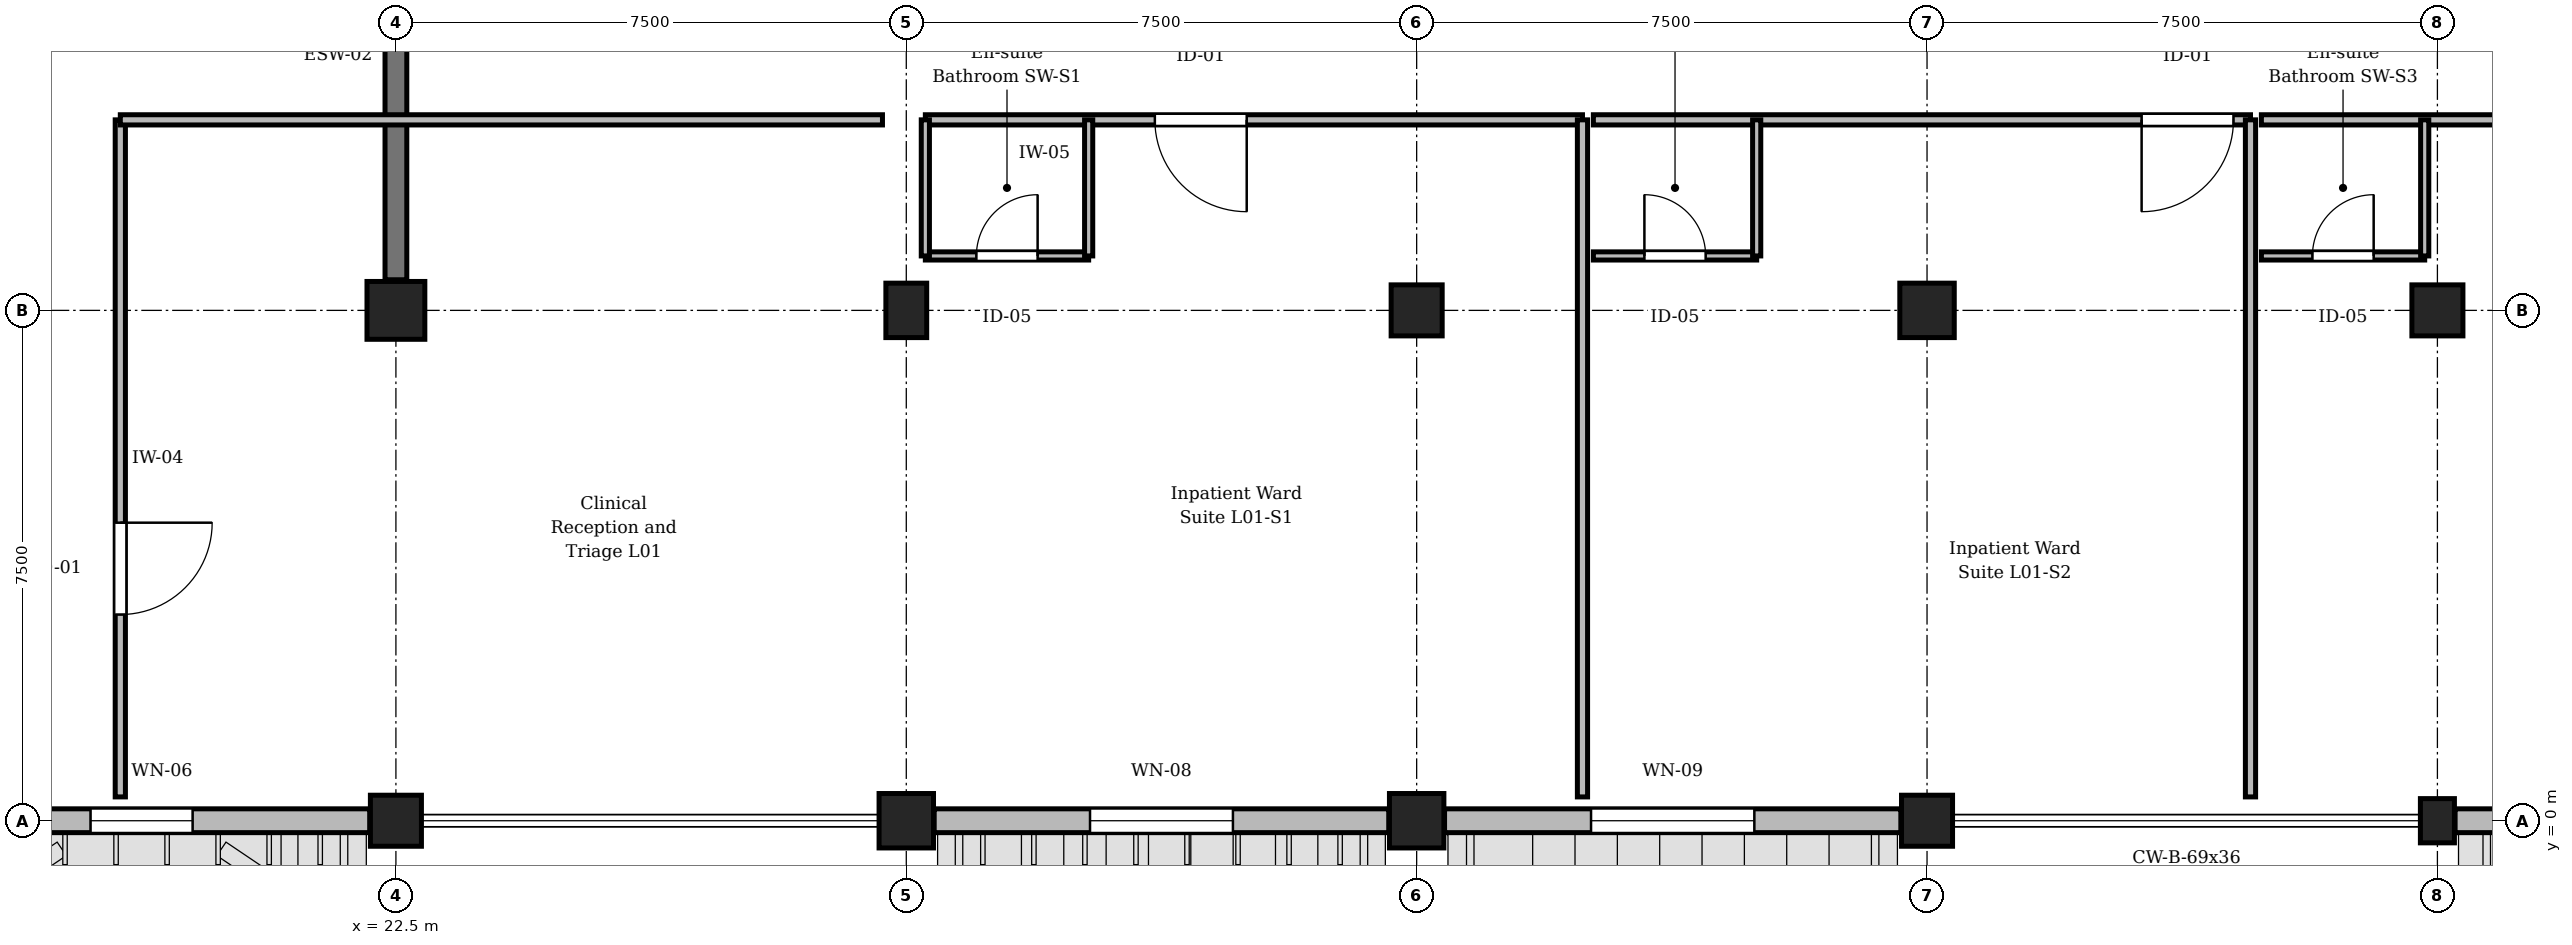
"""IFC4 building model, lengths in metres.
Left out: names, types, materials, properties, quantities, classifications, styles, units other than length and angle.
Written with IfcOpenShell. Run it as: python <this file> out.ifc"""

import sys

from ifc_helpers import new_model, si_unit, direction, frame, frame_2d, origin, origin_2d, place, context, subcontext, project, spatial, rectangle, circle, extrude, element, fill, save


model = new_model("IFC4")
c1 = context("Model", 3, precision=1e-05, world=origin(), true_north=direction((0.0, 1.0)))
c2 = subcontext(c1, "Body", "Model", "MODEL_VIEW")
j1 = project(units=[si_unit("LENGTHUNIT", "METRE"), si_unit("PLANEANGLEUNIT", "RADIAN")], contexts=[c1])
p1 = place(None, origin())
s1 = spatial("IfcSite", under=j1, at=p1, CompositionType="ELEMENT")
p2 = place(p1, origin())
s2 = spatial("IfcBuilding", under=s1, at=p2, CompositionType="ELEMENT")
p3 = place(p2, frame((0.0, 0.0, 4.8)))
s3 = spatial("IfcBuildingStorey", under=s2, at=p3, CompositionType="ELEMENT", Elevation=4.8)
p4 = place(p3, frame((22.5, 0.0, 0.0), z_axis=(0.0, 0.0, 1.0), x_axis=(1.0, 0.0, 0.0)))
e1 = element("IfcColumn", 1, at=p4, inside=s3, PredefinedType="COLUMN", context=c2, shape_type="SweptSolid", body=[
    extrude(circle(Radius=0.375, at=origin_2d()), origin(), (0.0, 0.0, 1.0), 4.5),
])
p5 = place(p3, frame((22.5, 7.5, 0.0), z_axis=(0.0, 0.0, 1.0), x_axis=(1.0, 0.0, 0.0)))
e2 = element("IfcColumn", 2, at=p5, inside=s3, PredefinedType="COLUMN", context=c2, shape_type="SweptSolid", body=[
    extrude(rectangle(XDim=0.85, YDim=0.85, at=origin_2d()), origin(), (0.0, 0.0, 1.0), 4.5),
])
p6 = place(p3, frame((30.0, 0.0, 0.0), z_axis=(0.0, 0.0, 1.0), x_axis=(1.0, 0.0, 0.0)))
e3 = element("IfcColumn", 3, at=p6, inside=s3, PredefinedType="COLUMN", context=c2, shape_type="SweptSolid", body=[
    extrude(rectangle(XDim=0.8, YDim=0.8, at=origin_2d()), origin(), (0.0, 0.0, 1.0), 4.5),
])
p7 = place(p3, frame((30.0, 7.5, 0.0), z_axis=(0.0, 0.0, 1.0), x_axis=(1.0, 0.0, 0.0)))
e4 = element("IfcColumn", 4, at=p7, inside=s3, PredefinedType="COLUMN", context=c2, shape_type="SweptSolid", body=[
    extrude(rectangle(XDim=0.6, YDim=0.8, at=origin_2d()), origin(), (0.0, 0.0, 1.0), 4.5),
])
p8 = place(p3, frame((37.5, 0.0, 0.0), z_axis=(0.0, 0.0, 1.0), x_axis=(1.0, 0.0, 0.0)))
e5 = element("IfcColumn", 5, at=p8, inside=s3, PredefinedType="COLUMN", context=c2, shape_type="SweptSolid", body=[
    extrude(rectangle(XDim=0.8, YDim=0.8, at=origin_2d()), origin(), (0.0, 0.0, 1.0), 4.5),
])
for number, where, z_axis, x_axis in (
    (6, (37.5, 7.5, 0.0), (0.0, 0.0, 1.0), (1.0, 0.0, 0.0)),
    (7, (45.0, 0.0, 0.0), (0.0, 0.0, 1.0), (1.0, 0.0, 0.0)),
):
    element("IfcColumn", number, at=place(p3, frame(where, z_axis=z_axis, x_axis=x_axis)), inside=s3, PredefinedType="COLUMN", context=c2, shape_type="SweptSolid", body=[
        extrude(circle(Radius=0.375, at=origin_2d()), origin(), (0.0, 0.0, 1.0), 4.5),
    ])
p9 = place(p3, frame((45.0, 7.5, 0.0), z_axis=(0.0, 0.0, 1.0), x_axis=(1.0, 0.0, 0.0)))
e8 = element("IfcColumn", 8, at=p9, inside=s3, PredefinedType="COLUMN", context=c2, shape_type="SweptSolid", body=[
    extrude(rectangle(XDim=0.8, YDim=0.8, at=origin_2d()), origin(), (0.0, 0.0, 1.0), 4.5),
])
p10 = place(p3, frame((52.5, 0.0, 0.0), z_axis=(0.0, 0.0, 1.0), x_axis=(1.0, 0.0, 0.0)))
e9 = element("IfcColumn", 9, at=p10, inside=s3, PredefinedType="COLUMN", context=c2, shape_type="SweptSolid", body=[
    extrude(rectangle(XDim=0.5, YDim=0.65, at=origin_2d()), origin(), (0.0, 0.0, 1.0), 4.5),
])
p11 = place(p3, frame((52.5, 7.5, 0.0), z_axis=(0.0, 0.0, 1.0), x_axis=(1.0, 0.0, 0.0)))
e10 = element("IfcColumn", 10, at=p11, inside=s3, PredefinedType="COLUMN", context=c2, shape_type="SweptSolid", body=[
    extrude(rectangle(XDim=0.75, YDim=0.75, at=origin_2d()), origin(), (0.0, 0.0, 1.0), 4.5),
])
p12 = place(p3, frame((22.5, 7.95, 0.0), z_axis=(0.0, 0.0, 1.0), x_axis=(0.0, 1.0, 0.0)))
e11 = element("IfcWall", 11, at=p12, inside=s3, PredefinedType="SHEAR", context=c2, shape_type="SweptSolid", body=[
    extrude(rectangle(XDim=6.6, YDim=0.32, at=frame_2d((3.3, 0.0))), origin(), (0.0, 0.0, 1.0), 3.63),
])
p13 = place(p3, frame((22.115, 0.0, 0.0), z_axis=(0.0, 0.0, 1.0), x_axis=(-1.0, 0.0, 0.0)))
e12 = element("IfcWall", 12, at=p13, inside=s3, PredefinedType="STANDARD", context=c2, shape_type="SweptSolid", body=[
    extrude(rectangle(XDim=6.705, YDim=0.35, at=frame_2d((3.353, 0.0))), origin(), (0.0, 0.0, 1.0), 3.63),
])
p14 = place(p13, frame((2.603, 0.0, 0.9)))
e13 = element("IfcOpeningElement", 13, at=p14, cuts=e12, PredefinedType="OPENING", context=c2, shape_type="SweptSolid", body=[
    extrude(rectangle(XDim=1.5, YDim=2.1, at=frame_2d((0.75, 1.05))), frame((0.0, 0.185, 0.0), z_axis=(0.0, -1.0, 0.0), x_axis=(1.0, 0.0, 0.0)), (0.0, 0.0, 1.0), 0.37),
])
p15 = place(p3, frame((37.09, 0.0, 0.0), z_axis=(0.0, 0.0, 1.0), x_axis=(-1.0, 0.0, 0.0)))
e14 = element("IfcWall", 14, at=p15, inside=s3, PredefinedType="STANDARD", context=c2, shape_type="SweptSolid", body=[
    extrude(rectangle(XDim=6.68, YDim=0.35, at=frame_2d((3.34, 0.0))), origin(), (0.0, 0.0, 1.0), 3.63),
])
p16 = place(p15, frame((2.29, 0.0, 0.9)))
e15 = element("IfcOpeningElement", 15, at=p16, cuts=e14, PredefinedType="OPENING", context=c2, shape_type="SweptSolid", body=[
    extrude(rectangle(XDim=2.1, YDim=2.1, at=frame_2d((1.05, 1.05))), frame((0.0, 0.185, 0.0), z_axis=(0.0, -1.0, 0.0), x_axis=(1.0, 0.0, 0.0)), (0.0, 0.0, 1.0), 0.37),
])
p17 = place(p3, frame((44.615, 0.0, 0.0), z_axis=(0.0, 0.0, 1.0), x_axis=(-1.0, 0.0, 0.0)))
e16 = element("IfcWall", 16, at=p17, inside=s3, PredefinedType="STANDARD", context=c2, shape_type="SweptSolid", body=[
    extrude(rectangle(XDim=6.705, YDim=0.35, at=frame_2d((3.353, 0.0))), origin(), (0.0, 0.0, 1.0), 3.63),
])
p18 = place(p17, frame((2.153, 0.0, 0.9)))
e17 = element("IfcOpeningElement", 17, at=p18, cuts=e16, PredefinedType="OPENING", context=c2, shape_type="SweptSolid", body=[
    extrude(rectangle(XDim=2.4, YDim=2.1, at=frame_2d((1.2, 1.05))), frame((0.0, 0.185, 0.0), z_axis=(0.0, -1.0, 0.0), x_axis=(1.0, 0.0, 0.0)), (0.0, 0.0, 1.0), 0.37),
])
p19 = place(p3, frame((59.64, 0.0, 0.0), z_axis=(0.0, 0.0, 1.0), x_axis=(-1.0, 0.0, 0.0)))
e18 = element("IfcWall", 18, at=p19, inside=s3, PredefinedType="STANDARD", context=c2, shape_type="SweptSolid", body=[
    extrude(rectangle(XDim=6.88, YDim=0.35, at=frame_2d((3.44, 0.0))), origin(), (0.0, 0.0, 1.0), 3.63),
])
p20 = place(p19, frame((2.54, 0.0, 0.9)))
e19 = element("IfcOpeningElement", 19, at=p20, cuts=e18, PredefinedType="OPENING", context=c2, shape_type="SweptSolid", body=[
    extrude(rectangle(XDim=1.8, YDim=1.95, at=frame_2d((0.9, 0.975))), frame((0.0, 0.185, 0.0), z_axis=(0.0, -1.0, 0.0), x_axis=(1.0, 0.0, 0.0)), (0.0, 0.0, 1.0), 0.37),
])
p21 = place(p3, frame((18.45, 10.3, 0.0), z_axis=(0.0, 0.0, 1.0), x_axis=(0.0, -1.0, 0.0)))
e20 = element("IfcWall", 20, at=p21, inside=s3, PredefinedType="PARTITIONING", context=c2, shape_type="SweptSolid", body=[
    extrude(rectangle(XDim=9.95, YDim=0.15, at=frame_2d((4.975, 0.0))), origin(), (0.0, 0.0, 1.0), 3.765),
])
p22 = place(p21, frame((5.92, 0.0, 0.0)))
e21 = element("IfcOpeningElement", 21, at=p22, cuts=e20, PredefinedType="OPENING", context=c2, shape_type="SweptSolid", body=[
    extrude(rectangle(XDim=1.35, YDim=2.25, at=frame_2d((0.675, 1.125))), frame((0.0, 0.085, 0.0), z_axis=(0.0, -1.0, 0.0), x_axis=(1.0, 0.0, 0.0)), (0.0, 0.0, 1.0), 0.17),
])
p23 = place(p3, frame((39.937, 10.3, 0.0), z_axis=(0.0, 0.0, 1.0), x_axis=(-1.0, 0.0, 0.0)))
e22 = element("IfcWall", 22, at=p23, inside=s3, PredefinedType="PARTITIONING", context=c2, shape_type="SweptSolid", body=[
    extrude(rectangle(XDim=9.657, YDim=0.15, at=frame_2d((4.828, 0.0))), origin(), (0.0, 0.0, 1.0), 4.165),
])
p24 = place(p23, frame((4.934, 0.0, 0.0)))
e23 = element("IfcOpeningElement", 23, at=p24, cuts=e22, PredefinedType="OPENING", context=c2, shape_type="SweptSolid", body=[
    extrude(rectangle(XDim=1.35, YDim=2.25, at=frame_2d((0.675, 1.125))), frame((0.0, 0.085, 0.0), z_axis=(0.0, -1.0, 0.0), x_axis=(1.0, 0.0, 0.0)), (0.0, 0.0, 1.0), 0.17),
])
p25 = place(p3, frame((30.28, 8.3, 0.0), z_axis=(0.0, 0.0, 1.0), x_axis=(1.0, 0.0, 0.0)))
e24 = element("IfcWall", 24, at=p25, inside=s3, PredefinedType="PARTITIONING", context=c2, shape_type="SweptSolid", body=[
    extrude(rectangle(XDim=2.4, YDim=0.12, at=frame_2d((1.2, 0.0))), origin(), (0.0, 0.0, 1.0), 4.165),
])
p26 = place(p25, frame((0.75, 0.0, 0.0)))
e25 = element("IfcOpeningElement", 25, at=p26, cuts=e24, PredefinedType="OPENING", context=c2, shape_type="SweptSolid", body=[
    extrude(rectangle(XDim=0.9, YDim=2.1, at=frame_2d((0.45, 1.05))), frame((0.0, 0.07, 0.0), z_axis=(0.0, -1.0, 0.0), x_axis=(1.0, 0.0, 0.0)), (0.0, 0.0, 1.0), 0.14),
])
p27 = place(p3, frame((32.68, 8.3, 0.0), z_axis=(0.0, 0.0, 1.0), x_axis=(0.0, 1.0, 0.0)))
e26 = element("IfcWall", 26, at=p27, inside=s3, PredefinedType="PARTITIONING", context=c2, shape_type="SweptSolid", body=[
    extrude(rectangle(XDim=2.0, YDim=0.12, at=frame_2d((1.0, 0.0))), origin(), (0.0, 0.0, 1.0), 4.165),
])
p28 = place(p3, frame((49.753, 10.3, 0.0), z_axis=(0.0, 0.0, 1.0), x_axis=(-1.0, 0.0, 0.0)))
e27 = element("IfcWall", 27, at=p28, inside=s3, PredefinedType="PARTITIONING", context=c2, shape_type="SweptSolid", body=[
    extrude(rectangle(XDim=9.657, YDim=0.15, at=frame_2d((4.828, 0.0))), origin(), (0.0, 0.0, 1.0), 4.165),
])
p29 = place(p28, frame((0.25, 0.0, 0.0)))
e28 = element("IfcOpeningElement", 28, at=p29, cuts=e27, PredefinedType="OPENING", context=c2, shape_type="SweptSolid", body=[
    extrude(rectangle(XDim=1.35, YDim=2.25, at=frame_2d((0.675, 1.125))), frame((0.0, 0.085, 0.0), z_axis=(0.0, -1.0, 0.0), x_axis=(1.0, 0.0, 0.0)), (0.0, 0.0, 1.0), 0.17),
])
p30 = place(p3, frame((40.097, 8.3, 0.0), z_axis=(0.0, 0.0, 1.0), x_axis=(1.0, 0.0, 0.0)))
e29 = element("IfcWall", 29, at=p30, inside=s3, PredefinedType="PARTITIONING", context=c2, shape_type="SweptSolid", body=[
    extrude(rectangle(XDim=2.4, YDim=0.12, at=frame_2d((1.2, 0.0))), origin(), (0.0, 0.0, 1.0), 4.165),
])
p31 = place(p30, frame((0.75, 0.0, 0.0)))
e30 = element("IfcOpeningElement", 30, at=p31, cuts=e29, PredefinedType="OPENING", context=c2, shape_type="SweptSolid", body=[
    extrude(rectangle(XDim=0.9, YDim=2.1, at=frame_2d((0.45, 1.05))), frame((0.0, 0.07, 0.0), z_axis=(0.0, -1.0, 0.0), x_axis=(1.0, 0.0, 0.0)), (0.0, 0.0, 1.0), 0.14),
])
p32 = place(p3, frame((42.497, 8.3, 0.0), z_axis=(0.0, 0.0, 1.0), x_axis=(0.0, 1.0, 0.0)))
e31 = element("IfcWall", 31, at=p32, inside=s3, PredefinedType="PARTITIONING", context=c2, shape_type="SweptSolid", body=[
    extrude(rectangle(XDim=2.0, YDim=0.12, at=frame_2d((1.0, 0.0))), origin(), (0.0, 0.0, 1.0), 4.165),
])
p33 = place(p3, frame((59.57, 10.3, 0.0), z_axis=(0.0, 0.0, 1.0), x_axis=(-1.0, 0.0, 0.0)))
e32 = element("IfcWall", 32, at=p33, inside=s3, PredefinedType="PARTITIONING", context=c2, shape_type="SweptSolid", body=[
    extrude(rectangle(XDim=9.657, YDim=0.15, at=frame_2d((4.828, 0.0))), origin(), (0.0, 0.0, 1.0), 4.165),
])
p34 = place(p33, frame((2.592, 0.0, 0.0)))
e33 = element("IfcOpeningElement", 33, at=p34, cuts=e32, PredefinedType="OPENING", context=c2, shape_type="SweptSolid", body=[
    extrude(rectangle(XDim=1.35, YDim=2.25, at=frame_2d((0.675, 1.125))), frame((0.0, 0.085, 0.0), z_axis=(0.0, -1.0, 0.0), x_axis=(1.0, 0.0, 0.0)), (0.0, 0.0, 1.0), 0.17),
])
p35 = place(p3, frame((49.913, 8.3, 0.0), z_axis=(0.0, 0.0, 1.0), x_axis=(1.0, 0.0, 0.0)))
e34 = element("IfcWall", 34, at=p35, inside=s3, PredefinedType="PARTITIONING", context=c2, shape_type="SweptSolid", body=[
    extrude(rectangle(XDim=2.4, YDim=0.12, at=frame_2d((1.2, 0.0))), origin(), (0.0, 0.0, 1.0), 4.165),
])
p36 = place(p35, frame((0.75, 0.0, 0.0)))
e35 = element("IfcOpeningElement", 35, at=p36, cuts=e34, PredefinedType="OPENING", context=c2, shape_type="SweptSolid", body=[
    extrude(rectangle(XDim=0.9, YDim=2.1, at=frame_2d((0.45, 1.05))), frame((0.0, 0.07, 0.0), z_axis=(0.0, -1.0, 0.0), x_axis=(1.0, 0.0, 0.0)), (0.0, 0.0, 1.0), 0.14),
])
p37 = place(p3, frame((52.313, 8.3, 0.0), z_axis=(0.0, 0.0, 1.0), x_axis=(0.0, 1.0, 0.0)))
e36 = element("IfcWall", 36, at=p37, inside=s3, PredefinedType="PARTITIONING", context=c2, shape_type="SweptSolid", body=[
    extrude(rectangle(XDim=2.0, YDim=0.12, at=frame_2d((1.0, 0.0))), origin(), (0.0, 0.0, 1.0), 3.565),
])
p38 = place(p3, frame((18.45, 10.3, 0.0), z_axis=(0.0, 0.0, 1.0), x_axis=(1.0, 0.0, 0.0)))
e37 = element("IfcWall", 37, at=p38, inside=s3, PredefinedType="PARTITIONING", context=c2, shape_type="SweptSolid", body=[
    extrude(rectangle(XDim=11.2, YDim=0.15, at=frame_2d((5.6, 0.0))), origin(), (0.0, 0.0, 1.0), 4.165),
])
for number, where, z_axis, x_axis in (
    (38, (39.937, 0.35, 0.0), (0.0, 0.0, 1.0), (0.0, 1.0, 0.0)),
    (39, (49.753, 0.35, 0.0), (0.0, 0.0, 1.0), (0.0, 1.0, 0.0)),
):
    element("IfcWall", number, at=place(p3, frame(where, z_axis=z_axis, x_axis=x_axis)), inside=s3, PredefinedType="PARTITIONING", context=c2, shape_type="SweptSolid", body=[
        extrude(rectangle(XDim=9.95, YDim=0.15, at=frame_2d((4.975, 0.0))), origin(), (0.0, 0.0, 1.0), 4.165),
    ])
p39 = place(p3, frame((30.28, 8.3, 0.0), z_axis=(0.0, 0.0, 1.0), x_axis=(0.0, 1.0, 0.0)))
e40 = element("IfcWall", 40, at=p39, inside=s3, PredefinedType="PARTITIONING", context=c2, shape_type="SweptSolid", body=[
    extrude(rectangle(XDim=2.0, YDim=0.12, at=frame_2d((1.0, 0.0))), origin(), (0.0, 0.0, 1.0), 3.565),
])
p40 = place(p14, origin())
e41 = element("IfcWindow", 41, at=p40, inside=s3, PartitioningType="SINGLE_PANEL", PredefinedType="WINDOW", context=c2, shape_type="SweptSolid", body=[
    extrude(rectangle(XDim=1.5, YDim=2.1, at=frame_2d((0.75, 1.05))), frame((0.0, 0.03, 0.0), z_axis=(0.0, -1.0, 0.0), x_axis=(1.0, 0.0, 0.0)), (0.0, 0.0, 1.0), 0.06),
])
fill(e13, e41)
p41 = place(p16, origin())
e42 = element("IfcWindow", 42, at=p41, inside=s3, PartitioningType="SINGLE_PANEL", PredefinedType="WINDOW", context=c2, shape_type="SweptSolid", body=[
    extrude(rectangle(XDim=2.1, YDim=2.1, at=frame_2d((1.05, 1.05))), frame((0.0, 0.03, 0.0), z_axis=(0.0, -1.0, 0.0), x_axis=(1.0, 0.0, 0.0)), (0.0, 0.0, 1.0), 0.06),
])
fill(e15, e42)
p42 = place(p18, origin())
e43 = element("IfcWindow", 43, at=p42, inside=s3, PartitioningType="SINGLE_PANEL", PredefinedType="WINDOW", context=c2, shape_type="SweptSolid", body=[
    extrude(rectangle(XDim=2.4, YDim=2.1, at=frame_2d((1.2, 1.05))), frame((0.0, 0.03, 0.0), z_axis=(0.0, -1.0, 0.0), x_axis=(1.0, 0.0, 0.0)), (0.0, 0.0, 1.0), 0.06),
])
fill(e17, e43)
p43 = place(p22, origin())
e44 = element("IfcDoor", 44, at=p43, inside=s3, OperationType="SINGLE_SWING_LEFT", PredefinedType="DOOR", context=c2, shape_type="SweptSolid", body=[
    extrude(rectangle(XDim=1.35, YDim=2.25, at=frame_2d((0.675, 1.125))), frame((0.0, 0.025, 0.0), z_axis=(0.0, -1.0, 0.0), x_axis=(1.0, 0.0, 0.0)), (0.0, 0.0, 1.0), 0.05),
])
fill(e21, e44)
p44 = place(p24, origin())
e45 = element("IfcDoor", 45, at=p44, inside=s3, OperationType="SINGLE_SWING_LEFT", PredefinedType="DOOR", context=c2, shape_type="SweptSolid", body=[
    extrude(rectangle(XDim=1.35, YDim=2.25, at=frame_2d((0.675, 1.125))), frame((0.0, 0.025, 0.0), z_axis=(0.0, -1.0, 0.0), x_axis=(1.0, 0.0, 0.0)), (0.0, 0.0, 1.0), 0.05),
])
fill(e23, e45)
p45 = place(p26, origin())
e46 = element("IfcDoor", 46, at=p45, inside=s3, OperationType="SINGLE_SWING_RIGHT", PredefinedType="DOOR", context=c2, shape_type="SweptSolid", body=[
    extrude(rectangle(XDim=0.9, YDim=2.1, at=frame_2d((0.45, 1.05))), frame((0.0, 0.025, 0.0), z_axis=(0.0, -1.0, 0.0), x_axis=(1.0, 0.0, 0.0)), (0.0, 0.0, 1.0), 0.05),
])
fill(e25, e46)
p46 = place(p29, origin())
e47 = element("IfcDoor", 47, at=p46, inside=s3, OperationType="SINGLE_SWING_RIGHT", PredefinedType="DOOR", context=c2, shape_type="SweptSolid", body=[
    extrude(rectangle(XDim=1.35, YDim=2.25, at=frame_2d((0.675, 1.125))), frame((0.0, 0.025, 0.0), z_axis=(0.0, -1.0, 0.0), x_axis=(1.0, 0.0, 0.0)), (0.0, 0.0, 1.0), 0.05),
])
fill(e28, e47)
p47 = place(p31, origin())
e48 = element("IfcDoor", 48, at=p47, inside=s3, OperationType="SINGLE_SWING_LEFT", PredefinedType="DOOR", context=c2, shape_type="SweptSolid", body=[
    extrude(rectangle(XDim=0.9, YDim=2.1, at=frame_2d((0.45, 1.05))), frame((0.0, 0.025, 0.0), z_axis=(0.0, -1.0, 0.0), x_axis=(1.0, 0.0, 0.0)), (0.0, 0.0, 1.0), 0.05),
])
fill(e30, e48)
p48 = place(p36, origin())
e49 = element("IfcDoor", 49, at=p48, inside=s3, OperationType="SINGLE_SWING_RIGHT", PredefinedType="DOOR", context=c2, shape_type="SweptSolid", body=[
    extrude(rectangle(XDim=0.9, YDim=2.1, at=frame_2d((0.45, 1.05))), frame((0.0, 0.025, 0.0), z_axis=(0.0, -1.0, 0.0), x_axis=(1.0, 0.0, 0.0)), (0.0, 0.0, 1.0), 0.05),
])
fill(e35, e49)
save(model, sys.argv[1])
